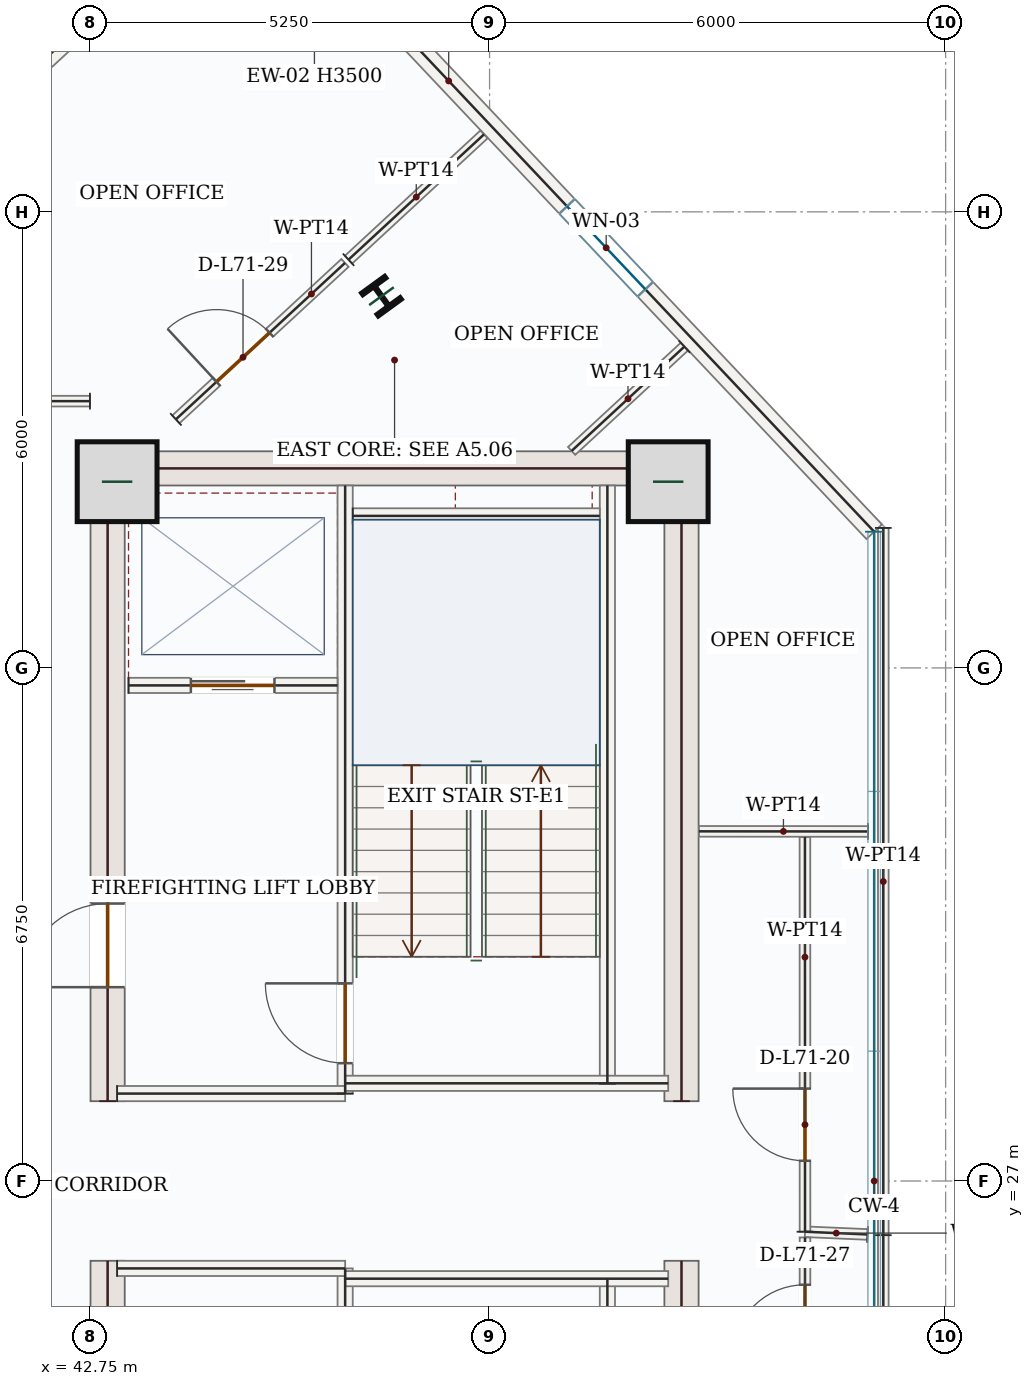
"""IFC4 building model, lengths in metres.
Left out: names, types, materials, properties, quantities, classifications, styles, units other than length and angle.
Written with IfcOpenShell. Run it as: python <this file> out.ifc"""

import sys

from ifc_helpers import new_model, si_unit, direction, frame, frame_2d, origin, origin_2d, place, context, subcontext, project, spatial, rectangle, i_section, extrude, source, transform, mapped, element, fill, save


model = new_model("IFC4")
c1 = context("Model", 3, precision=1e-05, world=origin(), true_north=direction((0.0, 1.0)))
c2 = subcontext(c1, "Body", "Model", "MODEL_VIEW")
j1 = project(units=[si_unit("LENGTHUNIT", "METRE"), si_unit("PLANEANGLEUNIT", "RADIAN")], contexts=[c1])
p1 = place(None, origin())
s1 = spatial("IfcSite", under=j1, at=p1, CompositionType="ELEMENT")
p2 = place(p1, origin())
s2 = spatial("IfcBuilding", under=s1, at=p2, CompositionType="ELEMENT")
p3 = place(p2, frame((0.0, 0.0, 295.35)))
s3 = spatial("IfcBuildingStorey", under=s2, at=p3, CompositionType="ELEMENT", Elevation=295.35)
p4 = place(p3, frame((42.975, 17.4, 0.0), z_axis=(0.0, 0.0, 1.0), x_axis=(0.0, 1.0, 0.0)))
e1 = element("IfcWall", 1, at=p4, inside=s3, PredefinedType="SHEAR", context=c2, shape_type="SweptSolid", body=[
    extrude(rectangle(XDim=8.55, YDim=0.45, at=frame_2d((4.275, 0.0))), origin(), (0.0, 0.0, 1.0), 3.5),
])
p5 = place(p4, frame((6.65, 0.0, 0.0)))
e2 = element("IfcOpeningElement", 2, at=p5, cuts=e1, PredefinedType="OPENING", context=c2, shape_type="SweptSolid", body=[
    extrude(rectangle(XDim=1.1, YDim=2.2, at=frame_2d((0.55, 1.1))), frame((0.0, 0.235, 0.0), z_axis=(0.0, -1.0, 0.0), x_axis=(1.0, 0.0, 0.0)), (0.0, 0.0, 1.0), 0.47),
])
p6 = place(p4, frame((1.75, 0.0, 0.0)))
e3 = element("IfcOpeningElement", 3, at=p6, cuts=e1, PredefinedType="OPENING", context=c2, shape_type="SweptSolid", body=[
    extrude(rectangle(XDim=1.3, YDim=2.2, at=frame_2d((0.65, 1.1))), frame((0.0, 0.235, 0.0), z_axis=(0.0, -1.0, 0.0), x_axis=(1.0, 0.0, 0.0)), (0.0, 0.0, 1.0), 0.47),
])
p7 = place(p4, frame((4.55, 0.0, 0.0)))
e4 = element("IfcOpeningElement", 4, at=p7, cuts=e1, PredefinedType="OPENING", context=c2, shape_type="SweptSolid", body=[
    extrude(rectangle(XDim=0.88, YDim=2.1, at=frame_2d((0.44, 1.05))), frame((0.0, 0.235, 0.0), z_axis=(0.0, -1.0, 0.0), x_axis=(1.0, 0.0, 0.0)), (0.0, 0.0, 1.0), 0.47),
])
p8 = place(p3, frame((42.975, 28.05, 0.0), z_axis=(0.0, 0.0, 1.0), x_axis=(0.0, 1.0, 0.0)))
e5 = element("IfcWall", 5, at=p8, inside=s3, PredefinedType="SHEAR", context=c2, shape_type="SweptSolid", body=[
    extrude(rectangle(XDim=8.55, YDim=0.45, at=frame_2d((4.275, 0.0))), origin(), (0.0, 0.0, 1.0), 3.5),
])
p9 = place(p8, frame((1.5, 0.0, 0.0)))
e6 = element("IfcOpeningElement", 6, at=p9, cuts=e5, PredefinedType="OPENING", context=c2, shape_type="SweptSolid", body=[
    extrude(rectangle(XDim=1.1, YDim=2.2, at=frame_2d((0.55, 1.1))), frame((0.0, 0.235, 0.0), z_axis=(0.0, -1.0, 0.0), x_axis=(1.0, 0.0, 0.0)), (0.0, 0.0, 1.0), 0.47),
])
m1 = source(origin(), c2, "Body", "SweptSolid", [
    extrude(rectangle(XDim=8.55, YDim=0.45, at=frame_2d((4.275, 0.0))), origin(), (0.0, 0.0, 1.0), 3.5),
])
for number, where, z_axis, x_axis in (
    (7, (50.525, 17.4, 0.0), (0.0, 0.0, 1.0), (0.0, 1.0, 0.0)),
    (8, (50.525, 28.05, 0.0), (0.0, 0.0, 1.0), (0.0, 1.0, 0.0)),
):
    element("IfcWall", number, at=place(p3, frame(where, z_axis=z_axis, x_axis=x_axis)), inside=s3, PredefinedType="SHEAR", context=c2, shape_type="MappedRepresentation", body=[
        mapped(m1, transform((0.0, 0.0, 0.0), x_axis=(1.0, 0.0, 0.0), y_axis=(0.0, 1.0, 0.0), z_axis=(0.0, 0.0, 1.0), scale=1.0)),
    ])
m2 = source(origin(), c2, "Body", "SweptSolid", [
    extrude(rectangle(XDim=7.1, YDim=0.45, at=frame_2d((3.55, 0.0))), origin(), (0.0, 0.0, 1.0), 3.5),
])
p10 = place(p3, frame((43.2, 36.375, 0.0), z_axis=(0.0, 0.0, 1.0), x_axis=(1.0, 0.0, 0.0)))
e9 = element("IfcWall", 9, at=p10, inside=s3, PredefinedType="SHEAR", context=c2, shape_type="MappedRepresentation", body=[
    mapped(m2, transform((0.0, 0.0, 0.0), x_axis=(1.0, 0.0, 0.0), y_axis=(0.0, 1.0, 0.0), z_axis=(0.0, 0.0, 1.0), scale=1.0)),
])
m3 = source(origin(), c2, "Body", "SweptSolid", [
    extrude(rectangle(XDim=1.05, YDim=1.05, at=origin_2d()), origin(), (0.0, 0.0, 1.0), 3.75),
])
for number, where, z_axis, x_axis in (
    (10, (43.1, 36.2, 0.0), (0.0, 0.0, 1.0), (1.0, 0.0, 0.0)),
    (11, (50.35, 36.2, 0.0), (0.0, 0.0, 1.0), (1.0, 0.0, 0.0)),
):
    element("IfcColumn", number, at=place(p3, frame(where, z_axis=z_axis, x_axis=x_axis)), inside=s3, PredefinedType="COLUMN", context=c2, shape_type="MappedRepresentation", body=[
        mapped(m3, transform((0.0, 0.0, 0.0), x_axis=(1.0, 0.0, 0.0), y_axis=(0.0, 1.0, 0.0), z_axis=(0.0, 0.0, 1.0), scale=1.0)),
    ])
m4 = source(origin(), c2, "Body", "SweptSolid", [
    extrude(i_section(OverallWidth=0.374, OverallDepth=0.372, WebThickness=0.016, FlangeThickness=0.026, FilletRadius=0.018, at=origin_2d()), origin(), (0.0, 0.0, 1.0), 3.75),
])
p11 = place(p3, frame((46.578, 38.641, 0.0), z_axis=(0.0, 0.0, 1.0), x_axis=(0.809016994375, 0.587785252292, 0.0)))
e12 = element("IfcColumn", 12, at=p11, inside=s3, PredefinedType="COLUMN", context=c2, shape_type="MappedRepresentation", body=[
    mapped(m4, transform((0.0, 0.0, 0.0), x_axis=(1.0, 0.0, 0.0), y_axis=(0.0, 1.0, 0.0), z_axis=(0.0, 0.0, 1.0), scale=1.0)),
])
p12 = place(p3, frame((39.447, 39.26, 0.0), z_axis=(0.0, 0.0, 1.0), x_axis=(0.734109106874, 0.679031530346, 0.0)))
e13 = element("IfcWall", 13, at=p12, inside=s3, PredefinedType="SOLIDWALL", context=c2, shape_type="SweptSolid", body=[
    extrude(rectangle(XDim=5.665, YDim=0.28, at=frame_2d((2.833, 0.0))), origin(), (0.0, 0.0, 1.0), 3.5),
])
p13 = place(p12, frame((2.082, 0.0, 0.85)))
e14 = element("IfcOpeningElement", 14, at=p13, cuts=e13, PredefinedType="OPENING", context=c2, shape_type="SweptSolid", body=[
    extrude(rectangle(XDim=1.5, YDim=1.5, at=frame_2d((0.75, 0.75))), frame((0.0, 0.15, 0.0), z_axis=(0.0, -1.0, 0.0), x_axis=(1.0, 0.0, 0.0)), (0.0, 0.0, 1.0), 0.3),
])
p14 = place(p3, frame((46.008, 43.013, 0.0), z_axis=(0.0, 0.0, 1.0), x_axis=(0.68643580465, -0.727190405667, 0.0)))
e15 = element("IfcWall", 15, at=p14, inside=s3, PredefinedType="SOLIDWALL", context=c2, shape_type="SweptSolid", body=[
    extrude(rectangle(XDim=10.274, YDim=0.28, at=frame_2d((5.137, 0.0))), origin(), (0.0, 0.0, 1.0), 3.5),
])
p15 = place(p14, frame((4.387, 0.0, 0.85)))
e16 = element("IfcOpeningElement", 16, at=p15, cuts=e15, PredefinedType="OPENING", context=c2, shape_type="SweptSolid", body=[
    extrude(rectangle(XDim=1.5, YDim=1.5, at=frame_2d((0.75, 0.75))), frame((0.0, 0.15, 0.0), z_axis=(0.0, -1.0, 0.0), x_axis=(1.0, 0.0, 0.0)), (0.0, 0.0, 1.0), 0.3),
])
m5 = source(origin(), c2, "Body", "SweptSolid", [
    extrude(rectangle(XDim=7.87, YDim=0.2, at=frame_2d((3.935, 0.0))), origin(), (0.0, 0.0, 1.0), 3.5),
])
for number, where, z_axis, x_axis in (
    (17, (49.55, 17.85, 0.0), (0.0, 0.0, 1.0), (0.0, 1.0, 0.0)),
    (18, (49.55, 28.28, 0.0), (0.0, 0.0, 1.0), (0.0, 1.0, 0.0)),
):
    element("IfcWall", number, at=place(p3, frame(where, z_axis=z_axis, x_axis=x_axis)), inside=s3, PredefinedType="SOLIDWALL", context=c2, shape_type="MappedRepresentation", body=[
        mapped(m5, transform((0.0, 0.0, 0.0), x_axis=(1.0, 0.0, 0.0), y_axis=(0.0, 1.0, 0.0), z_axis=(0.0, 0.0, 1.0), scale=1.0)),
    ])
p16 = place(p3, frame((46.1, 17.85, 0.0), z_axis=(0.0, 0.0, 1.0), x_axis=(0.0, 1.0, 0.0)))
e19 = element("IfcWall", 19, at=p16, inside=s3, PredefinedType="SOLIDWALL", context=c2, shape_type="SweptSolid", body=[
    extrude(rectangle(XDim=8.0, YDim=0.2, at=frame_2d((4.0, 0.0))), origin(), (0.0, 0.0, 1.0), 3.5),
])
p17 = place(p16, frame((6.3, 0.0, 0.0)))
e20 = element("IfcOpeningElement", 20, at=p17, cuts=e19, PredefinedType="OPENING", context=c2, shape_type="SweptSolid", body=[
    extrude(rectangle(XDim=1.05, YDim=2.15, at=frame_2d((0.525, 1.075))), frame((0.0, 0.11, 0.0), z_axis=(0.0, -1.0, 0.0), x_axis=(1.0, 0.0, 0.0)), (0.0, 0.0, 1.0), 0.22),
])
p18 = place(p3, frame((46.1, 28.15, 0.0), z_axis=(0.0, 0.0, 1.0), x_axis=(0.0, 1.0, 0.0)))
e21 = element("IfcWall", 21, at=p18, inside=s3, PredefinedType="SOLIDWALL", context=c2, shape_type="SweptSolid", body=[
    extrude(rectangle(XDim=8.0, YDim=0.2, at=frame_2d((4.0, 0.0))), origin(), (0.0, 0.0, 1.0), 3.5),
])
p19 = place(p18, frame((0.4, 0.0, 0.0)))
e22 = element("IfcOpeningElement", 22, at=p19, cuts=e21, PredefinedType="OPENING", context=c2, shape_type="SweptSolid", body=[
    extrude(rectangle(XDim=1.05, YDim=2.15, at=frame_2d((0.525, 1.075))), frame((0.0, 0.11, 0.0), z_axis=(0.0, -1.0, 0.0), x_axis=(1.0, 0.0, 0.0)), (0.0, 0.0, 1.0), 0.22),
])
m6 = source(origin(), c2, "Body", "SweptSolid", [
    extrude(rectangle(XDim=3.0, YDim=0.2, at=frame_2d((1.5, 0.0))), origin(), (0.0, 0.0, 1.0), 3.5),
])
p20 = place(p3, frame((43.1, 25.85, 0.0), z_axis=(0.0, 0.0, 1.0), x_axis=(1.0, 0.0, 0.0)))
e23 = element("IfcWall", 23, at=p20, inside=s3, PredefinedType="SOLIDWALL", context=c2, shape_type="MappedRepresentation", body=[
    mapped(m6, transform((0.0, 0.0, 0.0), x_axis=(1.0, 0.0, 0.0), y_axis=(0.0, 1.0, 0.0), z_axis=(0.0, 0.0, 1.0), scale=1.0)),
])
m7 = source(origin(), c2, "Body", "SweptSolid", [
    extrude(rectangle(XDim=4.25, YDim=0.2, at=frame_2d((2.125, 0.0))), origin(), (0.0, 0.0, 1.0), 3.5),
])
p21 = place(p3, frame((46.1, 25.715, 0.0), z_axis=(0.0, 0.0, 1.0), x_axis=(1.0, 0.0, 0.0)))
e24 = element("IfcWall", 24, at=p21, inside=s3, PredefinedType="SOLIDWALL", context=c2, shape_type="MappedRepresentation", body=[
    mapped(m7, transform((0.0, 0.0, 0.0), x_axis=(1.0, 0.0, 0.0), y_axis=(0.0, 1.0, 0.0), z_axis=(0.0, 0.0, 1.0), scale=1.0)),
])
p22 = place(p3, frame((43.1, 28.15, 0.0), z_axis=(0.0, 0.0, 1.0), x_axis=(1.0, 0.0, 0.0)))
e25 = element("IfcWall", 25, at=p22, inside=s3, PredefinedType="SOLIDWALL", context=c2, shape_type="MappedRepresentation", body=[
    mapped(m6, transform((0.0, 0.0, 0.0), x_axis=(1.0, 0.0, 0.0), y_axis=(0.0, 1.0, 0.0), z_axis=(0.0, 0.0, 1.0), scale=1.0)),
])
p23 = place(p3, frame((46.1, 28.285, 0.0), z_axis=(0.0, 0.0, 1.0), x_axis=(1.0, 0.0, 0.0)))
e26 = element("IfcWall", 26, at=p23, inside=s3, PredefinedType="SOLIDWALL", context=c2, shape_type="MappedRepresentation", body=[
    mapped(m7, transform((0.0, 0.0, 0.0), x_axis=(1.0, 0.0, 0.0), y_axis=(0.0, 1.0, 0.0), z_axis=(0.0, 0.0, 1.0), scale=1.0)),
])
m8 = source(origin(), c2, "Body", "SweptSolid", [
    extrude(rectangle(XDim=3.25, YDim=0.2, at=frame_2d((1.625, 0.0))), origin(), (0.0, 0.0, 1.0), 3.5),
])
p24 = place(p3, frame((46.2, 35.75, 0.0), z_axis=(0.0, 0.0, 1.0), x_axis=(1.0, 0.0, 0.0)))
e27 = element("IfcWall", 27, at=p24, inside=s3, PredefinedType="SOLIDWALL", context=c2, shape_type="MappedRepresentation", body=[
    mapped(m8, transform((0.0, 0.0, 0.0), x_axis=(1.0, 0.0, 0.0), y_axis=(0.0, 1.0, 0.0), z_axis=(0.0, 0.0, 1.0), scale=1.0)),
])
p25 = place(p3, frame((43.25, 33.52, 0.0), z_axis=(0.0, 0.0, 1.0), x_axis=(1.0, 0.0, 0.0)))
e28 = element("IfcWall", 28, at=p25, inside=s3, PredefinedType="SOLIDWALL", context=c2, shape_type="SweptSolid", body=[
    extrude(rectangle(XDim=2.75, YDim=0.2, at=frame_2d((1.375, 0.0))), origin(), (0.0, 0.0, 1.0), 3.5),
])
p26 = place(p25, frame((0.82, 0.0, 0.0)))
e29 = element("IfcOpeningElement", 29, at=p26, cuts=e28, PredefinedType="OPENING", context=c2, shape_type="SweptSolid", body=[
    extrude(rectangle(XDim=1.1, YDim=2.15, at=frame_2d((0.55, 1.075))), frame((0.0, 0.11, 0.0), z_axis=(0.0, -1.0, 0.0), x_axis=(1.0, 0.0, 0.0)), (0.0, 0.0, 1.0), 0.22),
])
p27 = place(p3, frame((43.873, 37.02, 0.0), z_axis=(0.0, 0.0, 1.0), x_axis=(0.734120521476, 0.679019189676, 0.0)))
e30 = element("IfcWall", 30, at=p27, inside=s3, PredefinedType="PARTITIONING", context=c2, shape_type="SweptSolid", body=[
    extrude(rectangle(XDim=3.031, YDim=0.14, at=frame_2d((1.515, 0.0))), origin(), (0.0, 0.0, 1.0), 3.5),
])
p28 = place(p27, frame((0.728, 0.0, 0.0)))
e31 = element("IfcOpeningElement", 31, at=p28, cuts=e30, PredefinedType="OPENING", context=c2, shape_type="SweptSolid", body=[
    extrude(rectangle(XDim=0.95, YDim=2.15, at=frame_2d((0.475, 1.075))), frame((0.0, 0.08, 0.0), z_axis=(0.0, -1.0, 0.0), x_axis=(1.0, 0.0, 0.0)), (0.0, 0.0, 1.0), 0.16),
])
m9 = source(origin(), c2, "Body", "SweptSolid", [
    extrude(rectangle(XDim=2.428, YDim=0.14, at=frame_2d((1.214, 0.0))), origin(), (0.0, 0.0, 1.0), 3.5),
])
p29 = place(p3, frame((46.144, 39.121, 0.0), z_axis=(0.0, 0.0, 1.0), x_axis=(0.734124504125, 0.679014883815, 0.0)))
e32 = element("IfcWall", 32, at=p29, inside=s3, PredefinedType="PARTITIONING", context=c2, shape_type="MappedRepresentation", body=[
    mapped(m9, transform((0.0, 0.0, 0.0), x_axis=(1.0, 0.0, 0.0), y_axis=(0.0, 1.0, 0.0), z_axis=(0.0, 0.0, 1.0), scale=1.0)),
])
m10 = source(origin(), c2, "Body", "SweptSolid", [
    extrude(rectangle(XDim=2.02, YDim=0.14, at=frame_2d((1.01, 0.0))), origin(), (0.0, 0.0, 1.0), 3.5),
])
p30 = place(p3, frame((50.562, 37.977, 0.0), z_axis=(0.0, 0.0, 1.0), x_axis=(-0.734126550915, -0.679012670899, 0.0)))
e33 = element("IfcWall", 33, at=p30, inside=s3, PredefinedType="PARTITIONING", context=c2, shape_type="MappedRepresentation", body=[
    mapped(m10, transform((0.0, 0.0, 0.0), x_axis=(1.0, 0.0, 0.0), y_axis=(0.0, 1.0, 0.0), z_axis=(0.0, 0.0, 1.0), scale=1.0)),
])
m11 = source(origin(), c2, "Body", "SweptSolid", [
    extrude(rectangle(XDim=2.223, YDim=0.14, at=frame_2d((1.111, 0.0))), origin(), (0.0, 0.0, 1.0), 3.5),
])
p31 = place(p3, frame((52.978, 31.598, 0.0), z_axis=(0.0, 0.0, 1.0), x_axis=(-0.999999704402, 0.000768892567, 0.0)))
e34 = element("IfcWall", 34, at=p31, inside=s3, PredefinedType="PARTITIONING", context=c2, shape_type="MappedRepresentation", body=[
    mapped(m11, transform((0.0, 0.0, 0.0), x_axis=(1.0, 0.0, 0.0), y_axis=(0.0, 1.0, 0.0), z_axis=(0.0, 0.0, 1.0), scale=1.0)),
])
m12 = source(origin(), c2, "Body", "SweptSolid", [
    extrude(rectangle(XDim=9.304, YDim=0.14, at=frame_2d((4.652, 0.0))), origin(), (0.0, 0.0, 1.0), 3.5),
])
p32 = place(p3, frame((53.18, 35.592, 0.0), z_axis=(0.0, 0.0, 1.0), x_axis=(0.0, -1.0, 0.0)))
e35 = element("IfcWall", 35, at=p32, inside=s3, PredefinedType="PARTITIONING", context=c2, shape_type="MappedRepresentation", body=[
    mapped(m12, transform((0.0, 0.0, 0.0), x_axis=(1.0, 0.0, 0.0), y_axis=(0.0, 1.0, 0.0), z_axis=(0.0, 0.0, 1.0), scale=1.0)),
])
m13 = source(origin(), c2, "Body", "SweptSolid", [
    extrude(rectangle(XDim=0.823, YDim=0.14, at=frame_2d((0.412, 0.0))), origin(), (0.0, 0.0, 1.0), 3.5),
])
p33 = place(p3, frame((52.972, 26.297, 0.0), z_axis=(0.0, 0.0, 1.0), x_axis=(-0.999049432265, 0.043591649315, 0.0)))
e36 = element("IfcWall", 36, at=p33, inside=s3, PredefinedType="PARTITIONING", context=c2, shape_type="MappedRepresentation", body=[
    mapped(m13, transform((0.0, 0.0, 0.0), x_axis=(1.0, 0.0, 0.0), y_axis=(0.0, 1.0, 0.0), z_axis=(0.0, 0.0, 1.0), scale=1.0)),
])
p34 = place(p3, frame((52.15, 26.333, 0.0), z_axis=(0.0, 0.0, 1.0), x_axis=(-0.000188111359, 0.999999982307, 0.0)))
e37 = element("IfcWall", 37, at=p34, inside=s3, PredefinedType="PARTITIONING", context=c2, shape_type="SweptSolid", body=[
    extrude(rectangle(XDim=5.191, YDim=0.14, at=frame_2d((2.596, 0.0))), origin(), (0.0, 0.0, 1.0), 3.5),
])
p35 = place(p34, frame((0.933, 0.0, 0.0)))
e38 = element("IfcOpeningElement", 38, at=p35, cuts=e37, PredefinedType="OPENING", context=c2, shape_type="SweptSolid", body=[
    extrude(rectangle(XDim=0.95, YDim=2.15, at=frame_2d((0.475, 1.075))), frame((0.0, 0.08, 0.0), z_axis=(0.0, -1.0, 0.0), x_axis=(1.0, 0.0, 0.0)), (0.0, 0.0, 1.0), 0.16),
])
p36 = place(p3, frame((52.149, 22.477, 0.0), z_axis=(0.0, 0.0, 1.0), x_axis=(0.000322913959, 0.999999947863, 0.0)))
e39 = element("IfcWall", 39, at=p36, inside=s3, PredefinedType="PARTITIONING", context=c2, shape_type="SweptSolid", body=[
    extrude(rectangle(XDim=3.78, YDim=0.14, at=frame_2d((1.89, 0.0))), origin(), (0.0, 0.0, 1.0), 3.5),
])
p37 = place(p36, frame((2.208, 0.0, 0.0)))
e40 = element("IfcOpeningElement", 40, at=p37, cuts=e39, PredefinedType="OPENING", context=c2, shape_type="SweptSolid", body=[
    extrude(rectangle(XDim=0.95, YDim=2.15, at=frame_2d((0.475, 1.075))), frame((0.0, 0.08, 0.0), z_axis=(0.0, -1.0, 0.0), x_axis=(1.0, 0.0, 0.0)), (0.0, 0.0, 1.0), 0.16),
])
m14 = source(origin(), c2, "Body", "SweptSolid", [
    extrude(rectangle(XDim=7.879, YDim=0.14, at=frame_2d((3.94, 0.0))), origin(), (0.0, 0.0, 1.0), 3.5),
])
p38 = place(p3, frame((53.18, 26.288, 0.0), z_axis=(0.0, 0.0, 1.0), x_axis=(0.0, -1.0, 0.0)))
e41 = element("IfcWall", 41, at=p38, inside=s3, PredefinedType="PARTITIONING", context=c2, shape_type="MappedRepresentation", body=[
    mapped(m14, transform((0.0, 0.0, 0.0), x_axis=(1.0, 0.0, 0.0), y_axis=(0.0, 1.0, 0.0), z_axis=(0.0, 0.0, 1.0), scale=1.0)),
])
p39 = place(p3, frame((42.742, 37.26, 0.0), z_axis=(0.0, 0.0, 1.0), x_axis=(-0.999999999261, 3.8433452e-05, 0.0)))
e42 = element("IfcWall", 42, at=p39, inside=s3, PredefinedType="PARTITIONING", context=c2, shape_type="SweptSolid", body=[
    extrude(rectangle(XDim=6.352, YDim=0.14, at=frame_2d((3.176, 0.0))), origin(), (0.0, 0.0, 1.0), 3.5),
])
p40 = place(p39, frame((4.214, 0.0, 0.0)))
e43 = element("IfcOpeningElement", 43, at=p40, cuts=e42, PredefinedType="OPENING", context=c2, shape_type="SweptSolid", body=[
    extrude(rectangle(XDim=0.95, YDim=2.15, at=frame_2d((0.475, 1.075))), frame((0.0, 0.08, 0.0), z_axis=(0.0, -1.0, 0.0), x_axis=(1.0, 0.0, 0.0)), (0.0, 0.0, 1.0), 0.16),
])
m15 = source(origin(), c2, "Body", "SweptSolid", [
    extrude(rectangle(XDim=1.5, YDim=1.5, at=frame_2d((0.75, 0.75))), frame((0.0, 0.03, 0.0), z_axis=(0.0, -1.0, 0.0), x_axis=(1.0, 0.0, 0.0)), (0.0, 0.0, 1.0), 0.06),
])
p41 = place(p15, origin())
e44 = element("IfcWindow", 44, at=p41, inside=s3, PartitioningType="SINGLE_PANEL", PredefinedType="WINDOW", context=c2, shape_type="MappedRepresentation", body=[
    mapped(m15, transform((0.0, 0.0, 0.0), x_axis=(1.0, 0.0, 0.0), y_axis=(0.0, 1.0, 0.0), z_axis=(0.0, 0.0, 1.0), scale=1.0)),
])
fill(e16, e44)
m16 = source(origin(), c2, "Body", "SweptSolid", [
    extrude(rectangle(XDim=1.05, YDim=2.15, at=frame_2d((0.525, 1.075))), frame((0.0, 0.025, 0.0), z_axis=(0.0, -1.0, 0.0), x_axis=(1.0, 0.0, 0.0)), (0.0, 0.0, 1.0), 0.05),
])
p42 = place(p19, origin())
e45 = element("IfcDoor", 45, at=p42, inside=s3, OperationType="SINGLE_SWING_RIGHT", PredefinedType="DOOR", context=c2, shape_type="MappedRepresentation", body=[
    mapped(m16, transform((0.0, 0.0, 0.0), x_axis=(1.0, 0.0, 0.0), y_axis=(0.0, 1.0, 0.0), z_axis=(0.0, 0.0, 1.0), scale=1.0)),
])
fill(e22, e45)
m17 = source(origin(), c2, "Body", "SweptSolid", [
    extrude(rectangle(XDim=1.1, YDim=2.15, at=frame_2d((0.55, 1.075))), frame((0.0, 0.025, 0.0), z_axis=(0.0, -1.0, 0.0), x_axis=(1.0, 0.0, 0.0)), (0.0, 0.0, 1.0), 0.05),
])
p43 = place(p26, origin())
e46 = element("IfcDoor", 46, at=p43, inside=s3, OperationType="DOUBLE_DOOR_SLIDING", PredefinedType="DOOR", context=c2, shape_type="MappedRepresentation", body=[
    mapped(m17, transform((0.0, 0.0, 0.0), x_axis=(1.0, 0.0, 0.0), y_axis=(0.0, 1.0, 0.0), z_axis=(0.0, 0.0, 1.0), scale=1.0)),
])
fill(e29, e46)
m18 = source(origin(), c2, "Body", "SweptSolid", [
    extrude(rectangle(XDim=1.1, YDim=2.2, at=frame_2d((0.55, 1.1))), frame((0.0, 0.025, 0.0), z_axis=(0.0, -1.0, 0.0), x_axis=(1.0, 0.0, 0.0)), (0.0, 0.0, 1.0), 0.05),
])
p44 = place(p9, origin())
e47 = element("IfcDoor", 47, at=p44, inside=s3, OperationType="SINGLE_SWING_LEFT", PredefinedType="DOOR", context=c2, shape_type="MappedRepresentation", body=[
    mapped(m18, transform((0.0, 0.0, 0.0), x_axis=(1.0, 0.0, 0.0), y_axis=(0.0, 1.0, 0.0), z_axis=(0.0, 0.0, 1.0), scale=1.0)),
])
fill(e6, e47)
m19 = source(origin(), c2, "Body", "SweptSolid", [
    extrude(rectangle(XDim=0.95, YDim=2.15, at=frame_2d((0.475, 1.075))), frame((0.0, 0.025, 0.0), z_axis=(0.0, -1.0, 0.0), x_axis=(1.0, 0.0, 0.0)), (0.0, 0.0, 1.0), 0.05),
])
p45 = place(p35, origin())
e48 = element("IfcDoor", 48, at=p45, inside=s3, OperationType="SINGLE_SWING_RIGHT", PredefinedType="DOOR", context=c2, shape_type="MappedRepresentation", body=[
    mapped(m19, transform((0.0, 0.0, 0.0), x_axis=(1.0, 0.0, 0.0), y_axis=(0.0, 1.0, 0.0), z_axis=(0.0, 0.0, 1.0), scale=1.0)),
])
fill(e38, e48)
p46 = place(p37, origin())
e49 = element("IfcDoor", 49, at=p46, inside=s3, OperationType="SINGLE_SWING_LEFT", PredefinedType="DOOR", context=c2, shape_type="MappedRepresentation", body=[
    mapped(m19, transform((0.0, 0.0, 0.0), x_axis=(1.0, 0.0, 0.0), y_axis=(0.0, 1.0, 0.0), z_axis=(0.0, 0.0, 1.0), scale=1.0)),
])
fill(e40, e49)
p47 = place(p28, origin())
e50 = element("IfcDoor", 50, at=p47, inside=s3, OperationType="SINGLE_SWING_LEFT", PredefinedType="DOOR", context=c2, shape_type="MappedRepresentation", body=[
    mapped(m19, transform((0.0, 0.0, 0.0), x_axis=(1.0, 0.0, 0.0), y_axis=(0.0, 1.0, 0.0), z_axis=(0.0, 0.0, 1.0), scale=1.0)),
])
fill(e31, e50)
save(model, sys.argv[1])
